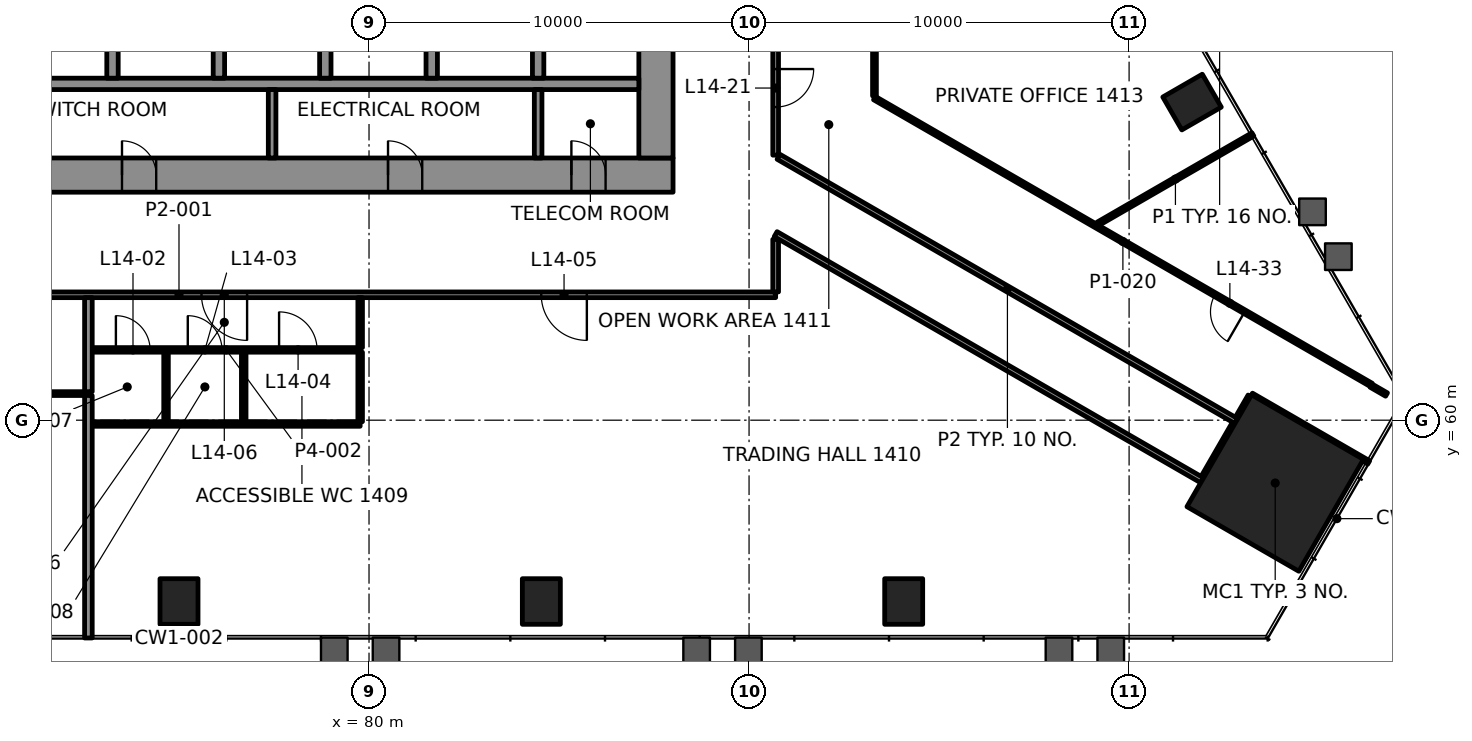
"""IFC4 building model, lengths in metres.
Left out: names, types, materials, properties, quantities, classifications, styles, units other than length and angle.
Written with IfcOpenShell. Run it as: python <this file> out.ifc"""

import sys

from ifc_helpers import new_model, si_unit, direction, frame, frame_2d, origin, origin_2d, place, context, subcontext, project, spatial, rectangle, extrude, element, fill, save


model = new_model("IFC4")
c1 = context("Model", 3, precision=1e-05, world=origin(), true_north=direction((0.0, 1.0)))
c2 = subcontext(c1, "Body", "Model", "MODEL_VIEW")
j1 = project(units=[si_unit("LENGTHUNIT", "METRE"), si_unit("PLANEANGLEUNIT", "RADIAN")], contexts=[c1])
p1 = place(None, origin())
s1 = spatial("IfcSite", under=j1, at=p1, CompositionType="ELEMENT")
p2 = place(p1, origin())
s2 = spatial("IfcBuilding", under=s1, at=p2, CompositionType="ELEMENT")
p3 = place(p2, frame((0.0, 0.0, 65.2)))
s3 = spatial("IfcBuildingStorey", under=s2, at=p3, CompositionType="ELEMENT", Elevation=65.2)
p4 = place(p3, frame((103.844, 58.347, 0.0), z_axis=(0.0, 0.0, 1.0), x_axis=(0.5, 0.866025403784, 0.0)))
e1 = element("IfcColumn", 1, at=p4, inside=s3, PredefinedType="COLUMN", context=c2, shape_type="SweptSolid", body=[
    extrude(rectangle(XDim=3.4, YDim=3.4, at=origin_2d()), origin(), (0.0, 0.0, 1.0), 4.2),
])
for number, where, z_axis, x_axis in (
    (2, (75.0, 55.229, -0.0), (0.0, 0.0, 1.0), (1.0, 0.0, 0.0)),
    (3, (84.534, 55.229, -0.0), (0.0, 0.0, 1.0), (1.0, 0.0, 0.0)),
    (4, (94.069, 55.229, -0.0), (0.0, 0.0, 1.0), (1.0, 0.0, 0.0)),
    (5, (101.657, 68.371, -0.0), (0.0, 0.0, 1.0), (-0.5, 0.866, 0.0)),
):
    element("IfcColumn", number, at=place(p3, frame(where, z_axis=z_axis, x_axis=x_axis)), inside=s3, PredefinedType="COLUMN", context=c2, shape_type="SweptSolid", body=[
        extrude(rectangle(XDim=1.0, YDim=1.2, at=origin_2d()), origin(), (0.0, 0.0, 1.0), 4.2),
    ])
p5 = place(p3, frame((62.0, 66.45, 0.0), z_axis=(0.0, 0.0, 1.0), x_axis=(1.0, 0.0, 0.0)))
e6 = element("IfcWall", 6, at=p5, inside=s3, PredefinedType="SHEAR", context=c2, shape_type="SweptSolid", body=[
    extrude(rectangle(XDim=26.0, YDim=0.9, at=frame_2d((13.0, 0.0))), origin(), (0.0, 0.0, 1.0), 4.0),
])
p6 = place(p5, frame((3.45, 0.0, 0.0)))
e7 = element("IfcOpeningElement", 7, at=p6, cuts=e6, PredefinedType="OPENING", context=c2, shape_type="SweptSolid", body=[
    extrude(rectangle(XDim=0.9, YDim=2.1, at=frame_2d((0.45, 1.05))), frame((0.0, 0.46, 0.0), z_axis=(0.0, -1.0, 0.0), x_axis=(1.0, 0.0, 0.0)), (0.0, 0.0, 1.0), 0.92),
])
p7 = place(p5, frame((6.425, 0.0, 0.0)))
e8 = element("IfcOpeningElement", 8, at=p7, cuts=e6, PredefinedType="OPENING", context=c2, shape_type="SweptSolid", body=[
    extrude(rectangle(XDim=0.9, YDim=2.1, at=frame_2d((0.45, 1.05))), frame((0.0, 0.46, 0.0), z_axis=(0.0, -1.0, 0.0), x_axis=(1.0, 0.0, 0.0)), (0.0, 0.0, 1.0), 0.92),
])
p8 = place(p5, frame((11.5, 0.0, 0.0)))
e9 = element("IfcOpeningElement", 9, at=p8, cuts=e6, PredefinedType="OPENING", context=c2, shape_type="SweptSolid", body=[
    extrude(rectangle(XDim=0.9, YDim=2.1, at=frame_2d((0.45, 1.05))), frame((0.0, 0.46, 0.0), z_axis=(0.0, -1.0, 0.0), x_axis=(1.0, 0.0, 0.0)), (0.0, 0.0, 1.0), 0.92),
])
p9 = place(p5, frame((18.5, 0.0, 0.0)))
e10 = element("IfcOpeningElement", 10, at=p9, cuts=e6, PredefinedType="OPENING", context=c2, shape_type="SweptSolid", body=[
    extrude(rectangle(XDim=0.9, YDim=2.1, at=frame_2d((0.45, 1.05))), frame((0.0, 0.46, 0.0), z_axis=(0.0, -1.0, 0.0), x_axis=(1.0, 0.0, 0.0)), (0.0, 0.0, 1.0), 0.92),
])
p10 = place(p5, frame((23.325, 0.0, 0.0)))
e11 = element("IfcOpeningElement", 11, at=p10, cuts=e6, PredefinedType="OPENING", context=c2, shape_type="SweptSolid", body=[
    extrude(rectangle(XDim=0.9, YDim=2.1, at=frame_2d((0.45, 1.05))), frame((0.0, 0.46, 0.0), z_axis=(0.0, -1.0, 0.0), x_axis=(1.0, 0.0, 0.0)), (0.0, 0.0, 1.0), 0.92),
])
p11 = place(p3, frame((87.55, 66.9, 0.0), z_axis=(0.0, 0.0, 1.0), x_axis=(0.0, 1.0, 0.0)))
e12 = element("IfcWall", 12, at=p11, inside=s3, PredefinedType="SHEAR", context=c2, shape_type="SweptSolid", body=[
    extrude(rectangle(XDim=16.2, YDim=0.9, at=frame_2d((8.1, 0.0))), origin(), (0.0, 0.0, 1.0), 4.0),
])
p12 = place(p11, frame((5.5, 0.0, 0.0)))
e13 = element("IfcOpeningElement", 13, at=p12, cuts=e12, PredefinedType="OPENING", context=c2, shape_type="SweptSolid", body=[
    extrude(rectangle(XDim=1.8, YDim=2.1, at=frame_2d((0.9, 1.05))), frame((0.0, 0.46, 0.0), z_axis=(0.0, -1.0, 0.0), x_axis=(1.0, 0.0, 0.0)), (0.0, 0.0, 1.0), 0.92),
])
p13 = place(p11, frame((12.272, 0.0, 0.0)))
e14 = element("IfcOpeningElement", 14, at=p13, cuts=e12, PredefinedType="OPENING", context=c2, shape_type="SweptSolid", body=[
    extrude(rectangle(XDim=0.9, YDim=2.1, at=frame_2d((0.45, 1.05))), frame((0.0, 0.46, 0.0), z_axis=(0.0, -1.0, 0.0), x_axis=(1.0, 0.0, 0.0)), (0.0, 0.0, 1.0), 0.92),
])
p14 = place(p3, frame((70.35, 68.85, 0.0), z_axis=(0.0, 0.0, 1.0), x_axis=(1.0, 0.0, 0.0)))
e15 = element("IfcWall", 15, at=p14, inside=s3, PredefinedType="SHEAR", context=c2, shape_type="SweptSolid", body=[
    extrude(rectangle(XDim=16.75, YDim=0.3, at=frame_2d((8.375, 0.0))), origin(), (0.0, 0.0, 1.0), 4.0),
])
for number, where, z_axis, x_axis in (
    (16, (73.25, 69.0, 0.0), (0.0, 0.0, 1.0), (0.0, 1.0, 0.0)),
    (17, (76.05, 69.0, 0.0), (0.0, 0.0, 1.0), (0.0, 1.0, 0.0)),
    (18, (78.85, 69.0, 0.0), (0.0, 0.0, 1.0), (0.0, 1.0, 0.0)),
    (19, (81.65, 69.0, 0.0), (0.0, 0.0, 1.0), (0.0, 1.0, 0.0)),
    (20, (84.45, 69.0, 0.0), (0.0, 0.0, 1.0), (0.0, 1.0, 0.0)),
):
    element("IfcWall", number, at=place(p3, frame(where, z_axis=z_axis, x_axis=x_axis)), inside=s3, PredefinedType="SHEAR", context=c2, shape_type="SweptSolid", body=[
        extrude(rectangle(XDim=2.6, YDim=0.3, at=frame_2d((1.3, 0.0))), origin(), (0.0, 0.0, 1.0), 4.0),
    ])
p15 = place(p3, frame((72.717, 59.9, 0.0), z_axis=(0.0, 0.0, 1.0), x_axis=(1.0, 0.0, 0.0)))
e21 = element("IfcWall", 21, at=p15, inside=s3, PredefinedType="PARTITIONING", context=c2, shape_type="SweptSolid", body=[
    extrude(rectangle(XDim=7.05, YDim=0.12, at=frame_2d((3.525, 0.0))), origin(), (0.0, 0.0, 1.0), 3.4),
])
p16 = place(p3, frame((57.232, 60.7, 0.0), z_axis=(0.0, 0.0, 1.0), x_axis=(1.0, 0.0, 0.0)))
e22 = element("IfcWall", 22, at=p16, inside=s3, PredefinedType="PARTITIONING", context=c2, shape_type="SweptSolid", body=[
    extrude(rectangle(XDim=15.385, YDim=0.1, at=frame_2d((7.692, 0.0))), origin(), (0.0, 0.0, 1.0), 3.4),
])
p17 = place(p16, frame((7.192, 0.0, 0.0)))
e23 = element("IfcOpeningElement", 23, at=p17, cuts=e22, PredefinedType="OPENING", context=c2, shape_type="SweptSolid", body=[
    extrude(rectangle(XDim=1.0, YDim=2.1, at=frame_2d((0.5, 1.05))), frame((0.0, 0.06, 0.0), z_axis=(0.0, -1.0, 0.0), x_axis=(1.0, 0.0, 0.0)), (0.0, 0.0, 1.0), 0.12),
])
p18 = place(p3, frame((72.716, 61.85, 0.0), z_axis=(0.0, 0.0, 1.0), x_axis=(1.0, 0.0, 0.0)))
e24 = element("IfcWall", 24, at=p18, inside=s3, PredefinedType="PARTITIONING", context=c2, shape_type="SweptSolid", body=[
    extrude(rectangle(XDim=7.051, YDim=0.12, at=frame_2d((3.525, 0.0))), origin(), (0.0, 0.0, 1.0), 3.4),
])
p19 = place(p18, frame((0.623, 0.0, 0.0)))
e25 = element("IfcOpeningElement", 25, at=p19, cuts=e24, PredefinedType="OPENING", context=c2, shape_type="SweptSolid", body=[
    extrude(rectangle(XDim=0.9, YDim=2.1, at=frame_2d((0.45, 1.05))), frame((0.0, 0.07, 0.0), z_axis=(0.0, -1.0, 0.0), x_axis=(1.0, 0.0, 0.0)), (0.0, 0.0, 1.0), 0.14),
])
p20 = place(p18, frame((2.515, 0.0, 0.0)))
e26 = element("IfcOpeningElement", 26, at=p20, cuts=e24, PredefinedType="OPENING", context=c2, shape_type="SweptSolid", body=[
    extrude(rectangle(XDim=0.9, YDim=2.1, at=frame_2d((0.45, 1.05))), frame((0.0, 0.07, 0.0), z_axis=(0.0, -1.0, 0.0), x_axis=(1.0, 0.0, 0.0)), (0.0, 0.0, 1.0), 0.14),
])
p21 = place(p18, frame((4.917, 0.0, 0.0)))
e27 = element("IfcOpeningElement", 27, at=p21, cuts=e24, PredefinedType="OPENING", context=c2, shape_type="SweptSolid", body=[
    extrude(rectangle(XDim=1.0, YDim=2.1, at=frame_2d((0.5, 1.05))), frame((0.0, 0.07, 0.0), z_axis=(0.0, -1.0, 0.0), x_axis=(1.0, 0.0, 0.0)), (0.0, 0.0, 1.0), 0.14),
])
p22 = place(p3, frame((90.699, 63.3, 0.0), z_axis=(0.0, 0.0, 1.0), x_axis=(-1.0, 0.0, 0.0)))
e28 = element("IfcWall", 28, at=p22, inside=s3, PredefinedType="PARTITIONING", context=c2, shape_type="SweptSolid", body=[
    extrude(rectangle(XDim=31.399, YDim=0.15, at=frame_2d((15.7, 0.0))), origin(), (0.0, 0.0, 1.0), 3.4),
])
p23 = place(p22, frame((4.968, 0.0, 0.0)))
e29 = element("IfcOpeningElement", 29, at=p23, cuts=e28, PredefinedType="OPENING", context=c2, shape_type="SweptSolid", body=[
    extrude(rectangle(XDim=1.2, YDim=2.1, at=frame_2d((0.6, 1.05))), frame((0.0, 0.085, 0.0), z_axis=(0.0, -1.0, 0.0), x_axis=(1.0, 0.0, 0.0)), (0.0, 0.0, 1.0), 0.17),
])
p24 = place(p22, frame((13.908, 0.0, 0.0)))
e30 = element("IfcOpeningElement", 30, at=p24, cuts=e28, PredefinedType="OPENING", context=c2, shape_type="SweptSolid", body=[
    extrude(rectangle(XDim=1.2, YDim=2.1, at=frame_2d((0.6, 1.05))), frame((0.0, 0.085, 0.0), z_axis=(0.0, -1.0, 0.0), x_axis=(1.0, 0.0, 0.0)), (0.0, 0.0, 1.0), 0.17),
])
p25 = place(p22, frame((24.14, 0.0, 0.0)))
e31 = element("IfcOpeningElement", 31, at=p25, cuts=e28, PredefinedType="OPENING", context=c2, shape_type="SweptSolid", body=[
    extrude(rectangle(XDim=1.0, YDim=2.1, at=frame_2d((0.5, 1.05))), frame((0.0, 0.085, 0.0), z_axis=(0.0, -1.0, 0.0), x_axis=(1.0, 0.0, 0.0)), (0.0, 0.0, 1.0), 0.17),
])
p26 = place(p3, frame((99.182, 65.168, 0.0), z_axis=(0.0, 0.0, 1.0), x_axis=(0.866024864377, 0.50000093428, 0.0)))
e32 = element("IfcWall", 32, at=p26, inside=s3, PredefinedType="PARTITIONING", context=c2, shape_type="SweptSolid", body=[
    extrude(rectangle(XDim=4.705, YDim=0.1, at=frame_2d((2.353, 0.0))), origin(), (0.0, 0.0, 1.0), 3.4),
])
p27 = place(p3, frame((101.96, 58.482, 0.0), z_axis=(0.0, 0.0, 1.0), x_axis=(0.500102515474, 0.865966208357, 0.0)))
e33 = element("IfcWall", 33, at=p27, inside=s3, PredefinedType="PARTITIONING", context=c2, shape_type="SweptSolid", body=[
    extrude(rectangle(XDim=1.65, YDim=0.15, at=frame_2d((0.825, 0.0))), origin(), (0.0, 0.0, 1.0), 3.247),
])
p28 = place(p3, frame((93.3, 80.061, 0.0), z_axis=(0.0, 0.0, 1.0), x_axis=(0.0, -1.0, 0.0)))
e34 = element("IfcWall", 34, at=p28, inside=s3, PredefinedType="PARTITIONING", context=c2, shape_type="SweptSolid", body=[
    extrude(rectangle(XDim=11.527, YDim=0.1, at=frame_2d((5.764, 0.0))), origin(), (0.0, 0.0, 1.0), 3.4),
])
p29 = place(p28, frame((1.716, 0.0, 0.0)))
e35 = element("IfcOpeningElement", 35, at=p29, cuts=e34, PredefinedType="OPENING", context=c2, shape_type="SweptSolid", body=[
    extrude(rectangle(XDim=0.9, YDim=2.1, at=frame_2d((0.45, 1.05))), frame((0.0, 0.06, 0.0), z_axis=(0.0, -1.0, 0.0), x_axis=(1.0, 0.0, 0.0)), (0.0, 0.0, 1.0), 0.12),
])
p30 = place(p28, frame((5.741, 0.0, 0.0)))
e36 = element("IfcOpeningElement", 36, at=p30, cuts=e34, PredefinedType="OPENING", context=c2, shape_type="SweptSolid", body=[
    extrude(rectangle(XDim=0.9, YDim=2.1, at=frame_2d((0.45, 1.05))), frame((0.0, 0.06, 0.0), z_axis=(0.0, -1.0, 0.0), x_axis=(1.0, 0.0, 0.0)), (0.0, 0.0, 1.0), 0.12),
])
p31 = place(p28, frame((9.342, 0.0, 0.0)))
e37 = element("IfcOpeningElement", 37, at=p31, cuts=e34, PredefinedType="OPENING", context=c2, shape_type="SweptSolid", body=[
    extrude(rectangle(XDim=0.9, YDim=2.1, at=frame_2d((0.45, 1.05))), frame((0.0, 0.06, 0.0), z_axis=(0.0, -1.0, 0.0), x_axis=(1.0, 0.0, 0.0)), (0.0, 0.0, 1.0), 0.12),
])
p32 = place(p3, frame((90.7, 63.375, 0.0), z_axis=(0.0, 0.0, 1.0), x_axis=(0.0, 1.0, 0.0)))
e38 = element("IfcWall", 38, at=p32, inside=s3, PredefinedType="PARTITIONING", context=c2, shape_type="SweptSolid", body=[
    extrude(rectangle(XDim=1.384, YDim=0.15, at=frame_2d((0.692, 0.0))), origin(), (0.0, 0.0, 1.0), 3.247),
])
p33 = place(p3, frame((90.7, 86.699, 0.0), z_axis=(0.0, 0.0, 1.0), x_axis=(0.0, -1.0, 0.0)))
e39 = element("IfcWall", 39, at=p33, inside=s3, PredefinedType="PARTITIONING", context=c2, shape_type="SweptSolid", body=[
    extrude(rectangle(XDim=19.725, YDim=0.15, at=frame_2d((9.862, 0.0))), origin(), (0.0, 0.0, 1.0), 3.4),
])
p34 = place(p33, frame((11.768, 0.0, 0.0)))
e40 = element("IfcOpeningElement", 40, at=p34, cuts=e39, PredefinedType="OPENING", context=c2, shape_type="SweptSolid", body=[
    extrude(rectangle(XDim=1.0, YDim=2.1, at=frame_2d((0.5, 1.05))), frame((0.0, 0.085, 0.0), z_axis=(0.0, -1.0, 0.0), x_axis=(1.0, 0.0, 0.0)), (0.0, 0.0, 1.0), 0.17),
])
p35 = place(p33, frame((17.459, 0.0, 0.0)))
e41 = element("IfcOpeningElement", 41, at=p35, cuts=e39, PredefinedType="OPENING", context=c2, shape_type="SweptSolid", body=[
    extrude(rectangle(XDim=1.0, YDim=2.1, at=frame_2d((0.5, 1.05))), frame((0.0, 0.085, 0.0), z_axis=(0.0, -1.0, 0.0), x_axis=(1.0, 0.0, 0.0)), (0.0, 0.0, 1.0), 0.17),
])
p36 = place(p3, frame((79.767, 59.96, 0.0), z_axis=(0.0, 0.0, 1.0), x_axis=(0.0, 1.0, 0.0)))
e42 = element("IfcWall", 42, at=p36, inside=s3, PredefinedType="PARTITIONING", context=c2, shape_type="SweptSolid", body=[
    extrude(rectangle(XDim=1.83, YDim=0.12, at=frame_2d((0.915, 0.0))), origin(), (0.0, 0.0, 1.0), 3.4),
])
for number, where, z_axis, x_axis in (
    (43, (76.703, 59.96, 0.0), (0.0, 0.0, 1.0), (0.0, 1.0, 0.0)),
    (44, (74.659, 59.96, 0.0), (0.0, 0.0, 1.0), (0.0, 1.0, 0.0)),
):
    element("IfcWall", number, at=place(p3, frame(where, z_axis=z_axis, x_axis=x_axis)), inside=s3, PredefinedType="PARTITIONING", context=c2, shape_type="SweptSolid", body=[
        extrude(rectangle(XDim=1.83, YDim=0.12, at=frame_2d((0.915, 0.0))), origin(), (0.0, 0.0, 1.0), 3.4),
    ])
p37 = place(p3, frame((72.616, 54.269, 0.0), z_axis=(0.0, 0.0, 1.0), x_axis=(0.0, 1.0, 0.0)))
e45 = element("IfcWall", 45, at=p37, inside=s3, PredefinedType="PARTITIONING", context=c2, shape_type="SweptSolid", body=[
    extrude(rectangle(XDim=6.381, YDim=0.2, at=frame_2d((3.19, 0.0))), origin(), (0.0, 0.0, 1.0), 3.165),
])
p38 = place(p3, frame((106.374, 60.928, 0.0), z_axis=(0.0, 0.0, 1.0), x_axis=(-0.866022109353, 0.50000570608, 0.0)))
e46 = element("IfcWall", 46, at=p38, inside=s3, PredefinedType="PARTITIONING", context=c2, shape_type="SweptSolid", body=[
    extrude(rectangle(XDim=15.096, YDim=0.1, at=frame_2d((7.548, 0.0))), origin(), (0.0, 0.0, 1.0), 3.4),
])
p39 = place(p38, frame((3.847, 0.0, 0.0)))
e47 = element("IfcOpeningElement", 47, at=p39, cuts=e46, PredefinedType="OPENING", context=c2, shape_type="SweptSolid", body=[
    extrude(rectangle(XDim=0.9, YDim=2.1, at=frame_2d((0.45, 1.05))), frame((0.0, 0.06, 0.0), z_axis=(0.0, -1.0, 0.0), x_axis=(1.0, 0.0, 0.0)), (0.0, 0.0, 1.0), 0.12),
])
p40 = place(p3, frame((106.774, 60.675, 0.0), z_axis=(0.0, 0.0, 1.0), x_axis=(-0.865979310119, 0.500079828073, 0.0)))
e48 = element("IfcWall", 48, at=p40, inside=s3, PredefinedType="PARTITIONING", context=c2, shape_type="SweptSolid", body=[
    extrude(rectangle(XDim=0.473, YDim=0.1, at=frame_2d((0.237, 0.0))), origin(), (0.0, 0.0, 1.0), 3.4),
])
p41 = place(p3, frame((106.305, 58.888, 0.0), z_axis=(0.0, 0.0, 1.0), x_axis=(-0.866061095881, 0.499938174379, 0.0)))
e49 = element("IfcWall", 49, at=p41, inside=s3, PredefinedType="PARTITIONING", context=c2, shape_type="SweptSolid", body=[
    extrude(rectangle(XDim=3.56, YDim=0.1, at=frame_2d((1.78, 0.0))), origin(), (0.0, 0.0, 1.0), 3.4),
])
p42 = place(p3, frame((102.822, 59.976, 0.0), z_axis=(0.0, 0.0, 1.0), x_axis=(-0.866019280802, 0.500010605167, 0.0)))
e50 = element("IfcWall", 50, at=p42, inside=s3, PredefinedType="PARTITIONING", context=c2, shape_type="SweptSolid", body=[
    extrude(rectangle(XDim=13.91, YDim=0.15, at=frame_2d((6.955, 0.0))), origin(), (0.0, 0.0, 1.0), 3.4),
])
p43 = place(p3, frame((101.922, 58.417, 0.0), z_axis=(0.0, 0.0, 1.0), x_axis=(-0.866024629744, 0.500001340675, 0.0)))
e51 = element("IfcWall", 51, at=p43, inside=s3, PredefinedType="PARTITIONING", context=c2, shape_type="SweptSolid", body=[
    extrude(rectangle(XDim=12.958, YDim=0.15, at=frame_2d((6.479, 0.0))), origin(), (0.0, 0.0, 1.0), 3.247),
])
p44 = place(p3, frame((72.616, 60.75, 0.0), z_axis=(0.0, 0.0, 1.0), x_axis=(0.0, 1.0, 0.0)))
e52 = element("IfcWall", 52, at=p44, inside=s3, PredefinedType="PARTITIONING", context=c2, shape_type="SweptSolid", body=[
    extrude(rectangle(XDim=2.475, YDim=0.2, at=frame_2d((1.238, 0.0))), origin(), (0.0, 0.0, 1.0), 3.4),
])
p45 = place(p3, frame((79.767, 61.91, 0.0), z_axis=(0.0, 0.0, 1.0), x_axis=(0.0, 1.0, 0.0)))
e53 = element("IfcWall", 53, at=p45, inside=s3, PredefinedType="PARTITIONING", context=c2, shape_type="SweptSolid", body=[
    extrude(rectangle(XDim=1.315, YDim=0.12, at=frame_2d((0.657, 0.0))), origin(), (0.0, 0.0, 1.0), 3.4),
])
p46 = place(p3, frame((102.86, 60.041, 0.0), z_axis=(0.0, 0.0, 1.0), x_axis=(0.500036104519, 0.866004557827, 0.0)))
e54 = element("IfcWall", 54, at=p46, inside=s3, PredefinedType="PARTITIONING", context=c2, shape_type="SweptSolid", body=[
    extrude(rectangle(XDim=0.674, YDim=0.15, at=frame_2d((0.337, 0.0))), origin(), (0.0, 0.0, 1.0), 3.4),
])
for number, where, z_axis, x_axis in (
    (55, (77.45, 66.9, 0.0), (0.0, 0.0, 1.0), (0.0, 1.0, 0.0)),
    (56, (84.45, 66.9, 0.0), (0.0, 0.0, 1.0), (0.0, 1.0, 0.0)),
):
    element("IfcWall", number, at=place(p3, frame(where, z_axis=z_axis, x_axis=x_axis)), inside=s3, PredefinedType="PARTITIONING", context=c2, shape_type="SweptSolid", body=[
        extrude(rectangle(XDim=1.8, YDim=0.2, at=frame_2d((0.9, 0.0))), origin(), (0.0, 0.0, 1.0), 4.0),
    ])
p47 = place(p19, origin())
e57 = element("IfcDoor", 57, at=p47, inside=s3, OperationType="SINGLE_SWING_RIGHT", PredefinedType="DOOR", context=c2, shape_type="SweptSolid", body=[
    extrude(rectangle(XDim=0.9, YDim=2.1, at=frame_2d((0.45, 1.05))), frame((0.0, 0.025, 0.0), z_axis=(0.0, -1.0, 0.0), x_axis=(1.0, 0.0, 0.0)), (0.0, 0.0, 1.0), 0.05),
])
fill(e25, e57)
p48 = place(p20, origin())
e58 = element("IfcDoor", 58, at=p48, inside=s3, OperationType="SINGLE_SWING_LEFT", PredefinedType="DOOR", context=c2, shape_type="SweptSolid", body=[
    extrude(rectangle(XDim=0.9, YDim=2.1, at=frame_2d((0.45, 1.05))), frame((0.0, 0.025, 0.0), z_axis=(0.0, -1.0, 0.0), x_axis=(1.0, 0.0, 0.0)), (0.0, 0.0, 1.0), 0.05),
])
fill(e26, e58)
p49 = place(p21, origin())
e59 = element("IfcDoor", 59, at=p49, inside=s3, OperationType="SINGLE_SWING_RIGHT", PredefinedType="DOOR", context=c2, shape_type="SweptSolid", body=[
    extrude(rectangle(XDim=1.0, YDim=2.1, at=frame_2d((0.5, 1.05))), frame((0.0, 0.025, 0.0), z_axis=(0.0, -1.0, 0.0), x_axis=(1.0, 0.0, 0.0)), (0.0, 0.0, 1.0), 0.05),
])
fill(e27, e59)
p50 = place(p23, origin())
e60 = element("IfcDoor", 60, at=p50, inside=s3, OperationType="DOUBLE_DOOR_SINGLE_SWING", PredefinedType="DOOR", context=c2, shape_type="SweptSolid", body=[
    extrude(rectangle(XDim=1.2, YDim=2.1, at=frame_2d((0.6, 1.05))), frame((0.0, 0.025, 0.0), z_axis=(0.0, -1.0, 0.0), x_axis=(1.0, 0.0, 0.0)), (0.0, 0.0, 1.0), 0.05),
])
fill(e29, e60)
p51 = place(p24, origin())
e61 = element("IfcDoor", 61, at=p51, inside=s3, OperationType="DOUBLE_DOOR_SINGLE_SWING", PredefinedType="DOOR", context=c2, shape_type="SweptSolid", body=[
    extrude(rectangle(XDim=1.2, YDim=2.1, at=frame_2d((0.6, 1.05))), frame((0.0, 0.025, 0.0), z_axis=(0.0, -1.0, 0.0), x_axis=(1.0, 0.0, 0.0)), (0.0, 0.0, 1.0), 0.05),
])
fill(e30, e61)
p52 = place(p35, origin())
e62 = element("IfcDoor", 62, at=p52, inside=s3, OperationType="SINGLE_SWING_LEFT", PredefinedType="DOOR", context=c2, shape_type="SweptSolid", body=[
    extrude(rectangle(XDim=1.0, YDim=2.1, at=frame_2d((0.5, 1.05))), frame((0.0, 0.025, 0.0), z_axis=(0.0, -1.0, 0.0), x_axis=(1.0, 0.0, 0.0)), (0.0, 0.0, 1.0), 0.05),
])
fill(e41, e62)
p53 = place(p39, origin())
e63 = element("IfcDoor", 63, at=p53, inside=s3, OperationType="SINGLE_SWING_LEFT", PredefinedType="DOOR", context=c2, shape_type="SweptSolid", body=[
    extrude(rectangle(XDim=0.9, YDim=2.1, at=frame_2d((0.45, 1.05))), frame((0.0, 0.025, 0.0), z_axis=(0.0, -1.0, 0.0), x_axis=(1.0, 0.0, 0.0)), (0.0, 0.0, 1.0), 0.05),
])
fill(e47, e63)
p54 = place(p8, origin())
e64 = element("IfcDoor", 64, at=p54, inside=s3, OperationType="SINGLE_SWING_LEFT", PredefinedType="DOOR", context=c2, shape_type="SweptSolid", body=[
    extrude(rectangle(XDim=0.9, YDim=2.1, at=frame_2d((0.45, 1.05))), frame((0.0, 0.17, 0.0), z_axis=(0.0, -1.0, 0.0), x_axis=(1.0, 0.0, 0.0)), (0.0, 0.0, 1.0), 0.34),
])
fill(e9, e64)
p55 = place(p9, origin())
e65 = element("IfcDoor", 65, at=p55, inside=s3, OperationType="SINGLE_SWING_RIGHT", PredefinedType="DOOR", context=c2, shape_type="SweptSolid", body=[
    extrude(rectangle(XDim=0.9, YDim=2.1, at=frame_2d((0.45, 1.05))), frame((0.0, 0.17, 0.0), z_axis=(0.0, -1.0, 0.0), x_axis=(1.0, 0.0, 0.0)), (0.0, 0.0, 1.0), 0.34),
])
fill(e10, e65)
p56 = place(p10, origin())
e66 = element("IfcDoor", 66, at=p56, inside=s3, OperationType="SINGLE_SWING_LEFT", PredefinedType="DOOR", context=c2, shape_type="SweptSolid", body=[
    extrude(rectangle(XDim=0.9, YDim=2.1, at=frame_2d((0.45, 1.05))), frame((0.0, 0.17, 0.0), z_axis=(0.0, -1.0, 0.0), x_axis=(1.0, 0.0, 0.0)), (0.0, 0.0, 1.0), 0.34),
])
fill(e11, e66)
save(model, sys.argv[1])
